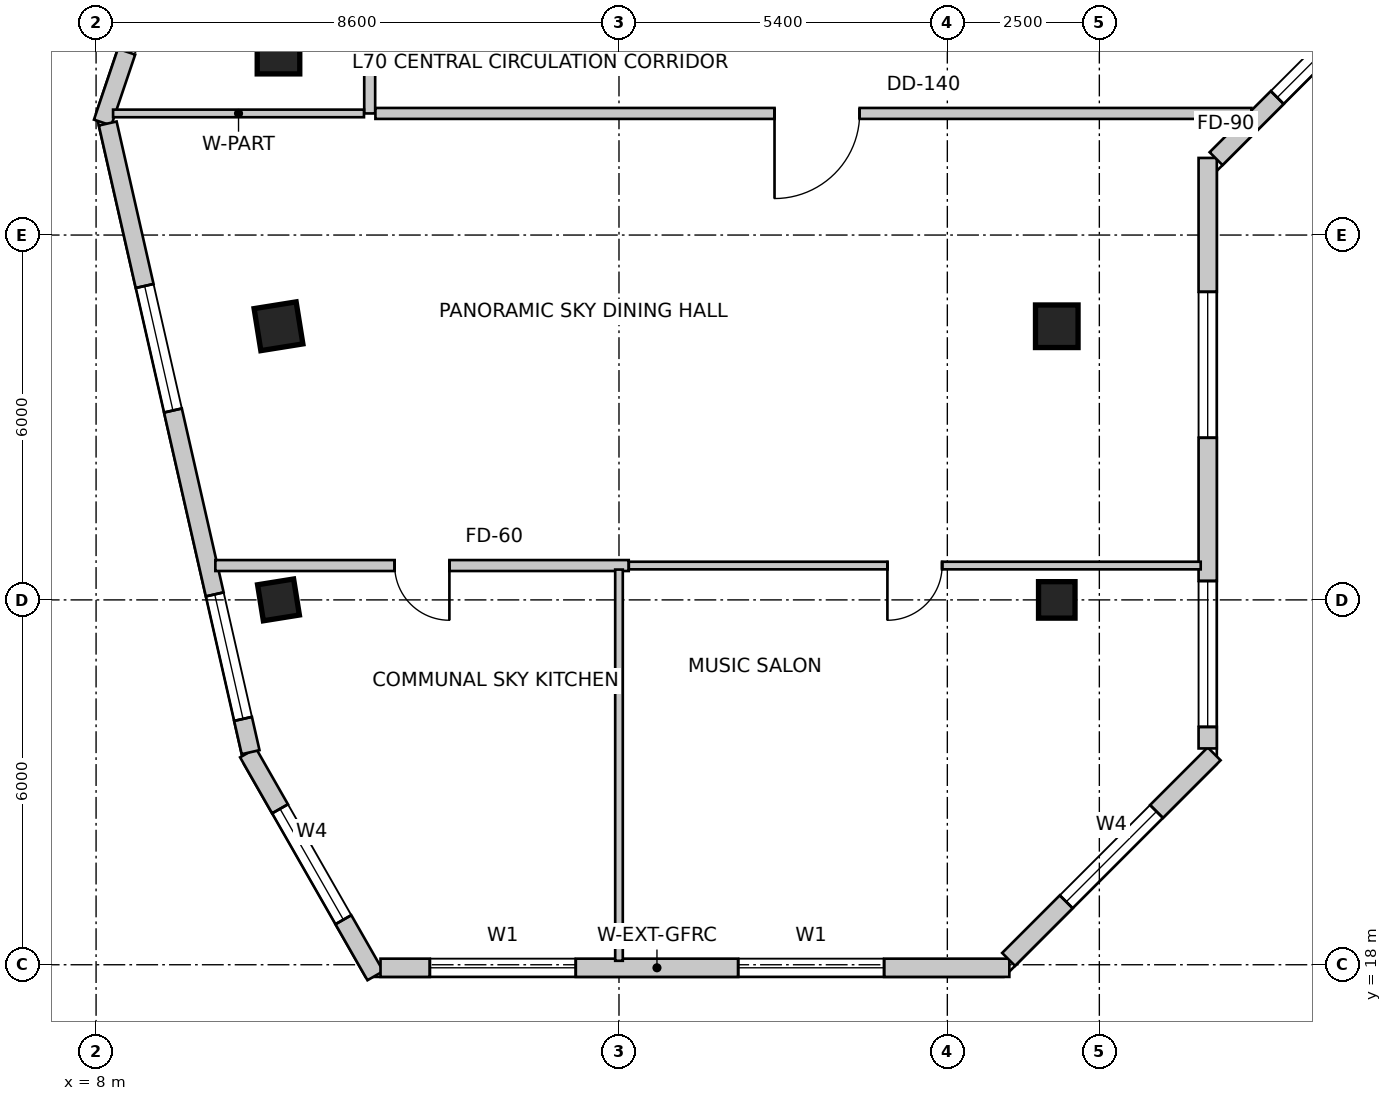
"""IFC4 building model, lengths in metres.
Left out: names, types, materials, properties, quantities, classifications, styles, units other than length and angle.
Written with IfcOpenShell. Run it as: python <this file> out.ifc"""

import sys

from ifc_helpers import new_model, si_unit, direction, frame, frame_2d, origin, origin_2d, place, context, subcontext, project, spatial, rectangle, extrude, source, transform, mapped, element, fill, save


model = new_model("IFC4")
c1 = context("Model", 3, precision=1e-05, world=origin(), true_north=direction((0.0, 1.0)))
c2 = subcontext(c1, "Body", "Model", "MODEL_VIEW")
j1 = project(units=[si_unit("LENGTHUNIT", "METRE"), si_unit("PLANEANGLEUNIT", "RADIAN")], contexts=[c1])
p1 = place(None, origin())
s1 = spatial("IfcSite", under=j1, at=p1, CompositionType="ELEMENT")
p2 = place(p1, origin())
s2 = spatial("IfcBuilding", under=s1, at=p2, CompositionType="ELEMENT")
p3 = place(p2, frame((0.0, 0.0, 274.5)))
s3 = spatial("IfcBuildingStorey", under=s2, at=p3, CompositionType="ELEMENT", Elevation=274.5)
m1 = source(origin(), c2, "Body", "SweptSolid", [
    extrude(rectangle(XDim=0.7, YDim=0.7, at=origin_2d()), origin(), (0.0, 0.0, 1.0), 3.6),
])
for number, where, z_axis, x_axis in (
    (1, (11.0, 33.0, 0.0), (0.0, 0.0, 1.0), (1.0, 0.0, 0.0)),
    (2, (11.0, 28.5, 0.0), (0.0, 0.0, 1.0), (0.158, -0.987, 0.0)),
):
    element("IfcColumn", number, at=place(p3, frame(where, z_axis=z_axis, x_axis=x_axis)), inside=s3, PredefinedType="COLUMN", context=c2, shape_type="MappedRepresentation", body=[
        mapped(m1, transform((0.0, 0.0, 0.0), scale=1.0)),
    ])
m2 = source(origin(), c2, "Body", "SweptSolid", [
    extrude(rectangle(XDim=0.6, YDim=0.6, at=origin_2d()), origin(), (0.0, 0.0, 1.0), 3.6),
])
p4 = place(p3, frame((11.0, 24.0, 0.0), z_axis=(0.0, 0.0, 1.0), x_axis=(0.158158067254, -0.987413806751, 0.0)))
e3 = element("IfcColumn", 3, at=p4, inside=s3, PredefinedType="COLUMN", context=c2, shape_type="MappedRepresentation", body=[
    mapped(m2, transform((0.0, 0.0, 0.0), scale=1.0)),
])
p5 = place(p3, frame((23.8, 28.5, 0.0), z_axis=(0.0, 0.0, 1.0), x_axis=(1.0, 0.0, 0.0)))
e4 = element("IfcColumn", 4, at=p5, inside=s3, PredefinedType="COLUMN", context=c2, shape_type="MappedRepresentation", body=[
    mapped(m1, transform((0.0, 0.0, 0.0), scale=1.0)),
])
p6 = place(p3, frame((23.8, 24.0, 0.0), z_axis=(0.0, 0.0, 1.0), x_axis=(1.0, 0.0, 0.0)))
e5 = element("IfcColumn", 5, at=p6, inside=s3, PredefinedType="COLUMN", context=c2, shape_type="MappedRepresentation", body=[
    mapped(m2, transform((0.0, 0.0, 0.0), scale=1.0)),
])
p7 = place(p3, frame((10.499, 21.485, 0.0), z_axis=(0.0, 0.0, 1.0), x_axis=(0.496163848656, -0.868228907194, 0.0)))
e6 = element("IfcWall", 6, at=p7, inside=s3, PredefinedType="SOLIDWALL", context=c2, shape_type="SweptSolid", body=[
    extrude(rectangle(XDim=4.222, YDim=0.3, at=frame_2d((2.111, 0.0))), origin(), (0.0, 0.0, 1.0), 3.35),
])
m3 = source(origin(), c2, "Body", "SweptSolid", [
    extrude(rectangle(XDim=2.1, YDim=2.0, at=frame_2d((1.05, 1.0))), frame((0.0, 0.16, 0.0), z_axis=(0.0, -1.0, 0.0), x_axis=(1.0, 0.0, 0.0)), (0.0, 0.0, 1.0), 0.32),
])
p8 = place(p7, frame((1.061, 0.0, 0.85)))
e7 = element("IfcOpeningElement", 7, at=p8, cuts=e6, PredefinedType="OPENING", context=c2, shape_type="MappedRepresentation", body=[
    mapped(m3, transform((0.0, 0.0, 0.0), scale=1.0)),
])
p9 = place(p3, frame((12.678, 17.95, 0.0), z_axis=(0.0, 0.0, 1.0), x_axis=(1.0, 0.0, 0.0)))
e8 = element("IfcWall", 8, at=p9, inside=s3, PredefinedType="SOLIDWALL", context=c2, shape_type="SweptSolid", body=[
    extrude(rectangle(XDim=10.342, YDim=0.3, at=frame_2d((5.171, 0.0))), origin(), (0.0, 0.0, 1.0), 3.35),
])
m4 = source(origin(), c2, "Body", "SweptSolid", [
    extrude(rectangle(XDim=2.4, YDim=2.2, at=frame_2d((1.2, 1.1))), frame((0.0, 0.16, 0.0), z_axis=(0.0, -1.0, 0.0), x_axis=(1.0, 0.0, 0.0)), (0.0, 0.0, 1.0), 0.32),
])
p10 = place(p9, frame((0.811, 0.0, 0.85)))
e9 = element("IfcOpeningElement", 9, at=p10, cuts=e8, PredefinedType="OPENING", context=c2, shape_type="MappedRepresentation", body=[
    mapped(m4, transform((0.0, 0.0, 0.0), scale=1.0)),
])
p11 = place(p9, frame((5.882, 0.0, 0.85)))
e10 = element("IfcOpeningElement", 10, at=p11, cuts=e8, PredefinedType="OPENING", context=c2, shape_type="MappedRepresentation", body=[
    mapped(m4, transform((0.0, 0.0, 0.0), scale=1.0)),
])
p12 = place(p3, frame((23.008, 18.088, 0.0), z_axis=(0.0, 0.0, 1.0), x_axis=(0.707106781187, 0.707106781187, 0.0)))
e11 = element("IfcWall", 11, at=p12, inside=s3, PredefinedType="SOLIDWALL", context=c2, shape_type="SweptSolid", body=[
    extrude(rectangle(XDim=4.781, YDim=0.3, at=frame_2d((2.39, 0.0))), origin(), (0.0, 0.0, 1.0), 3.35),
])
p13 = place(p12, frame((1.34, 0.0, 0.85)))
e12 = element("IfcOpeningElement", 12, at=p13, cuts=e11, PredefinedType="OPENING", context=c2, shape_type="MappedRepresentation", body=[
    mapped(m3, transform((0.0, 0.0, 0.0), scale=1.0)),
])
p14 = place(p3, frame((26.282, 21.557, 0.0), z_axis=(0.0, 0.0, 1.0), x_axis=(0.0, 1.0, 0.0)))
e13 = element("IfcWall", 13, at=p14, inside=s3, PredefinedType="SOLIDWALL", context=c2, shape_type="SweptSolid", body=[
    extrude(rectangle(XDim=9.711, YDim=0.3, at=frame_2d((4.855, 0.0))), origin(), (0.0, 0.0, 1.0), 3.35),
])
p15 = place(p14, frame((0.354, 0.0, 0.85)))
e14 = element("IfcOpeningElement", 14, at=p15, cuts=e13, PredefinedType="OPENING", context=c2, shape_type="MappedRepresentation", body=[
    mapped(m4, transform((0.0, 0.0, 0.0), scale=1.0)),
])
p16 = place(p14, frame((5.109, 0.0, 0.85)))
e15 = element("IfcOpeningElement", 15, at=p16, cuts=e13, PredefinedType="OPENING", context=c2, shape_type="MappedRepresentation", body=[
    mapped(m4, transform((0.0, 0.0, 0.0), scale=1.0)),
])
p17 = place(p3, frame((26.42, 31.256, 0.0), z_axis=(0.0, 0.0, 1.0), x_axis=(0.707106781187, 0.707106781187, 0.0)))
e16 = element("IfcWall", 16, at=p17, inside=s3, PredefinedType="SOLIDWALL", context=c2, shape_type="SweptSolid", body=[
    extrude(rectangle(XDim=2.907, YDim=0.3, at=frame_2d((1.454, 0.0))), origin(), (0.0, 0.0, 1.0), 3.35),
])
m5 = source(origin(), c2, "Body", "SweptSolid", [
    extrude(rectangle(XDim=0.9, YDim=1.6, at=frame_2d((0.45, 0.8))), frame((0.0, 0.16, 0.0), z_axis=(0.0, -1.0, 0.0), x_axis=(1.0, 0.0, 0.0)), (0.0, 0.0, 1.0), 0.32),
])
p18 = place(p17, frame((1.422, 0.0, 0.85)))
e17 = element("IfcOpeningElement", 17, at=p18, cuts=e16, PredefinedType="OPENING", context=c2, shape_type="MappedRepresentation", body=[
    mapped(m5, transform((0.0, 0.0, 0.0), scale=1.0)),
])
p19 = place(p3, frame((8.501, 33.015, 0.0), z_axis=(0.0, 0.0, 1.0), x_axis=(-0.319916718913, -0.94744566755, 0.0)))
e18 = element("IfcWall", 18, at=p19, inside=s3, PredefinedType="SOLIDWALL", context=c2, shape_type="SweptSolid", body=[
    extrude(rectangle(XDim=1.23, YDim=0.3, at=frame_2d((0.615, 0.0))), origin(), (0.0, 0.0, 1.0), 3.35),
])
p20 = place(p3, frame((8.191, 31.834, 0.0), z_axis=(0.0, 0.0, 1.0), x_axis=(0.221636032737, -0.975129462683, 0.0)))
e19 = element("IfcWall", 19, at=p20, inside=s3, PredefinedType="SOLIDWALL", context=c2, shape_type="SweptSolid", body=[
    extrude(rectangle(XDim=10.602, YDim=0.3, at=frame_2d((5.301, 0.0))), origin(), (0.0, 0.0, 1.0), 3.35),
])
p21 = place(p20, frame((2.74, 0.0, 0.85)))
e20 = element("IfcOpeningElement", 20, at=p21, cuts=e19, PredefinedType="OPENING", context=c2, shape_type="MappedRepresentation", body=[
    mapped(m3, transform((0.0, 0.0, 0.0), scale=1.0)),
])
p22 = place(p20, frame((7.941, 0.0, 0.85)))
e21 = element("IfcOpeningElement", 21, at=p22, cuts=e19, PredefinedType="OPENING", context=c2, shape_type="MappedRepresentation", body=[
    mapped(m3, transform((0.0, 0.0, 0.0), scale=1.0)),
])
p23 = place(p3, frame((12.5, 32.0, 0.0), z_axis=(0.0, 0.0, 1.0), x_axis=(0.0, 1.0, 0.0)))
e22 = element("IfcWall", 22, at=p23, inside=s3, PredefinedType="PARTITIONING", context=c2, shape_type="SweptSolid", body=[
    extrude(rectangle(XDim=1.556, YDim=0.18, at=frame_2d((0.778, 0.0))), origin(), (0.0, 0.0, 1.0), 3.019),
])
p24 = place(p3, frame((27.001, 32.0, 0.0), z_axis=(0.0, 0.0, 1.0), x_axis=(-1.0, 0.0, 0.0)))
e23 = element("IfcWall", 23, at=p24, inside=s3, PredefinedType="PARTITIONING", context=c2, shape_type="SweptSolid", body=[
    extrude(rectangle(XDim=14.407, YDim=0.18, at=frame_2d((7.204, 0.0))), origin(), (0.0, 0.0, 1.0), 3.019),
])
m6 = source(origin(), c2, "Body", "SweptSolid", [
    extrude(rectangle(XDim=1.4, YDim=2.15, at=frame_2d((0.7, 1.075))), frame((0.0, 0.1, 0.0), z_axis=(0.0, -1.0, 0.0), x_axis=(1.0, 0.0, 0.0)), (0.0, 0.0, 1.0), 0.2),
])
p25 = place(p24, frame((6.443, 0.0, 0.0)))
e24 = element("IfcOpeningElement", 24, at=p25, cuts=e23, PredefinedType="OPENING", context=c2, shape_type="MappedRepresentation", body=[
    mapped(m6, transform((0.0, 0.0, 0.0), scale=1.0)),
])
p26 = place(p3, frame((12.406, 32.0, 0.0), z_axis=(0.0, 0.0, 1.0), x_axis=(-1.0, 0.0, 0.0)))
e25 = element("IfcWall", 25, at=p26, inside=s3, PredefinedType="PARTITIONING", context=c2, shape_type="SweptSolid", body=[
    extrude(rectangle(XDim=4.126, YDim=0.125, at=frame_2d((2.063, 0.0))), origin(), (0.0, 0.0, 1.0), 2.642),
])
p27 = place(p3, frame((16.76, 24.565, 0.0), z_axis=(0.0, 0.0, 1.0), x_axis=(-1.0, 0.0, 0.0)))
e26 = element("IfcWall", 26, at=p27, inside=s3, PredefinedType="PARTITIONING", context=c2, shape_type="SweptSolid", body=[
    extrude(rectangle(XDim=6.798, YDim=0.18, at=frame_2d((3.399, 0.0))), origin(), (0.0, 0.0, 1.0), 2.642),
])
m7 = source(origin(), c2, "Body", "SweptSolid", [
    extrude(rectangle(XDim=0.9, YDim=2.15, at=frame_2d((0.45, 1.075))), frame((0.0, 0.1, 0.0), z_axis=(0.0, -1.0, 0.0), x_axis=(1.0, 0.0, 0.0)), (0.0, 0.0, 1.0), 0.2),
])
p28 = place(p27, frame((2.949, 0.0, 0.0)))
e27 = element("IfcOpeningElement", 27, at=p28, cuts=e26, PredefinedType="OPENING", context=c2, shape_type="MappedRepresentation", body=[
    mapped(m7, transform((0.0, 0.0, 0.0), scale=1.0)),
])
p29 = place(p3, frame((26.167, 24.565, 0.0), z_axis=(0.0, 0.0, 1.0), x_axis=(-1.0, 0.0, 0.0)))
e28 = element("IfcWall", 28, at=p29, inside=s3, PredefinedType="PARTITIONING", context=c2, shape_type="SweptSolid", body=[
    extrude(rectangle(XDim=9.405, YDim=0.125, at=frame_2d((4.703, 0.0))), origin(), (0.0, 0.0, 1.0), 2.642),
])
m8 = source(origin(), c2, "Body", "SweptSolid", [
    extrude(rectangle(XDim=0.9, YDim=2.15, at=frame_2d((0.45, 1.075))), frame((0.0, 0.073, 0.0), z_axis=(0.0, -1.0, 0.0), x_axis=(1.0, 0.0, 0.0)), (0.0, 0.0, 1.0), 0.145),
])
p30 = place(p29, frame((4.252, 0.0, 0.0)))
e29 = element("IfcOpeningElement", 29, at=p30, cuts=e28, PredefinedType="OPENING", context=c2, shape_type="MappedRepresentation", body=[
    mapped(m8, transform((0.0, 0.0, 0.0), scale=1.0)),
])
p31 = place(p3, frame((16.6, 24.499, 0.0), z_axis=(0.0, 0.0, 1.0), x_axis=(0.0, -1.0, 0.0)))
e30 = element("IfcWall", 30, at=p31, inside=s3, PredefinedType="PARTITIONING", context=c2, shape_type="SweptSolid", body=[
    extrude(rectangle(XDim=6.434, YDim=0.125, at=frame_2d((3.217, 0.0))), origin(), (0.0, 0.0, 1.0), 2.979),
])
m9 = source(origin(), c2, "Body", "SweptSolid", [
    extrude(rectangle(XDim=2.1, YDim=2.0, at=frame_2d((1.05, 1.0))), frame((0.0, -0.015, 0.0), z_axis=(0.0, -1.0, 0.0), x_axis=(1.0, 0.0, 0.0)), (0.0, 0.0, 1.0), 0.06),
])
p32 = place(p8, origin())
e31 = element("IfcWindow", 31, at=p32, inside=s3, PartitioningType="SINGLE_PANEL", PredefinedType="WINDOW", context=c2, shape_type="MappedRepresentation", body=[
    mapped(m9, transform((0.0, 0.0, 0.0), scale=1.0)),
])
fill(e7, e31)
m10 = source(origin(), c2, "Body", "SweptSolid", [
    extrude(rectangle(XDim=2.4, YDim=2.2, at=frame_2d((1.2, 1.1))), frame((0.0, -0.015, 0.0), z_axis=(0.0, -1.0, 0.0), x_axis=(1.0, 0.0, 0.0)), (0.0, 0.0, 1.0), 0.06),
])
p33 = place(p10, origin())
e32 = element("IfcWindow", 32, at=p33, inside=s3, PartitioningType="SINGLE_PANEL", PredefinedType="WINDOW", context=c2, shape_type="MappedRepresentation", body=[
    mapped(m10, transform((0.0, 0.0, 0.0), scale=1.0)),
])
fill(e9, e32)
p34 = place(p11, origin())
e33 = element("IfcWindow", 33, at=p34, inside=s3, PartitioningType="SINGLE_PANEL", PredefinedType="WINDOW", context=c2, shape_type="MappedRepresentation", body=[
    mapped(m10, transform((0.0, 0.0, 0.0), scale=1.0)),
])
fill(e10, e33)
p35 = place(p13, origin())
e34 = element("IfcWindow", 34, at=p35, inside=s3, PartitioningType="SINGLE_PANEL", PredefinedType="WINDOW", context=c2, shape_type="MappedRepresentation", body=[
    mapped(m9, transform((0.0, 0.0, 0.0), scale=1.0)),
])
fill(e12, e34)
p36 = place(p15, origin())
e35 = element("IfcWindow", 35, at=p36, inside=s3, PartitioningType="SINGLE_PANEL", PredefinedType="WINDOW", context=c2, shape_type="MappedRepresentation", body=[
    mapped(m10, transform((0.0, 0.0, 0.0), scale=1.0)),
])
fill(e14, e35)
p37 = place(p16, origin())
e36 = element("IfcWindow", 36, at=p37, inside=s3, PartitioningType="SINGLE_PANEL", PredefinedType="WINDOW", context=c2, shape_type="MappedRepresentation", body=[
    mapped(m10, transform((0.0, 0.0, 0.0), scale=1.0)),
])
fill(e15, e36)
m11 = source(origin(), c2, "Body", "SweptSolid", [
    extrude(rectangle(XDim=0.9, YDim=1.6, at=frame_2d((0.45, 0.8))), frame((0.0, -0.015, 0.0), z_axis=(0.0, -1.0, 0.0), x_axis=(1.0, 0.0, 0.0)), (0.0, 0.0, 1.0), 0.06),
])
p38 = place(p18, origin())
e37 = element("IfcWindow", 37, at=p38, inside=s3, PartitioningType="SINGLE_PANEL", PredefinedType="WINDOW", context=c2, shape_type="MappedRepresentation", body=[
    mapped(m11, transform((0.0, 0.0, 0.0), scale=1.0)),
])
fill(e17, e37)
p39 = place(p21, origin())
e38 = element("IfcWindow", 38, at=p39, inside=s3, PartitioningType="SINGLE_PANEL", PredefinedType="WINDOW", context=c2, shape_type="MappedRepresentation", body=[
    mapped(m9, transform((0.0, 0.0, 0.0), scale=1.0)),
])
fill(e20, e38)
p40 = place(p22, origin())
e39 = element("IfcWindow", 39, at=p40, inside=s3, PartitioningType="SINGLE_PANEL", PredefinedType="WINDOW", context=c2, shape_type="MappedRepresentation", body=[
    mapped(m9, transform((0.0, 0.0, 0.0), scale=1.0)),
])
fill(e21, e39)
m12 = source(origin(), c2, "Body", "SweptSolid", [
    extrude(rectangle(XDim=1.4, YDim=2.15, at=frame_2d((0.7, 1.075))), frame((0.0, 0.025, 0.0), z_axis=(0.0, -1.0, 0.0), x_axis=(1.0, 0.0, 0.0)), (0.0, 0.0, 1.0), 0.05),
])
p41 = place(p25, origin())
e40 = element("IfcDoor", 40, at=p41, inside=s3, OperationType="SINGLE_SWING_RIGHT", PredefinedType="DOOR", context=c2, shape_type="MappedRepresentation", body=[
    mapped(m12, transform((0.0, 0.0, 0.0), scale=1.0)),
])
fill(e24, e40)
m13 = source(origin(), c2, "Body", "SweptSolid", [
    extrude(rectangle(XDim=0.9, YDim=2.15, at=frame_2d((0.45, 1.075))), frame((0.0, 0.025, 0.0), z_axis=(0.0, -1.0, 0.0), x_axis=(1.0, 0.0, 0.0)), (0.0, 0.0, 1.0), 0.05),
])
p42 = place(p28, origin())
e41 = element("IfcDoor", 41, at=p42, inside=s3, OperationType="SINGLE_SWING_LEFT", PredefinedType="DOOR", context=c2, shape_type="MappedRepresentation", body=[
    mapped(m13, transform((0.0, 0.0, 0.0), scale=1.0)),
])
fill(e27, e41)
m14 = source(origin(), c2, "Body", "SweptSolid", [
    extrude(rectangle(XDim=0.9, YDim=2.15, at=frame_2d((0.45, 1.075))), frame((0.0, 0.025, 0.0), z_axis=(0.0, -1.0, 0.0), x_axis=(1.0, 0.0, 0.0)), (0.0, 0.0, 1.0), 0.05),
])
p43 = place(p30, origin())
e42 = element("IfcDoor", 42, at=p43, inside=s3, OperationType="SINGLE_SWING_RIGHT", PredefinedType="DOOR", context=c2, shape_type="MappedRepresentation", body=[
    mapped(m14, transform((0.0, 0.0, 0.0), scale=1.0)),
])
fill(e29, e42)
save(model, sys.argv[1])
